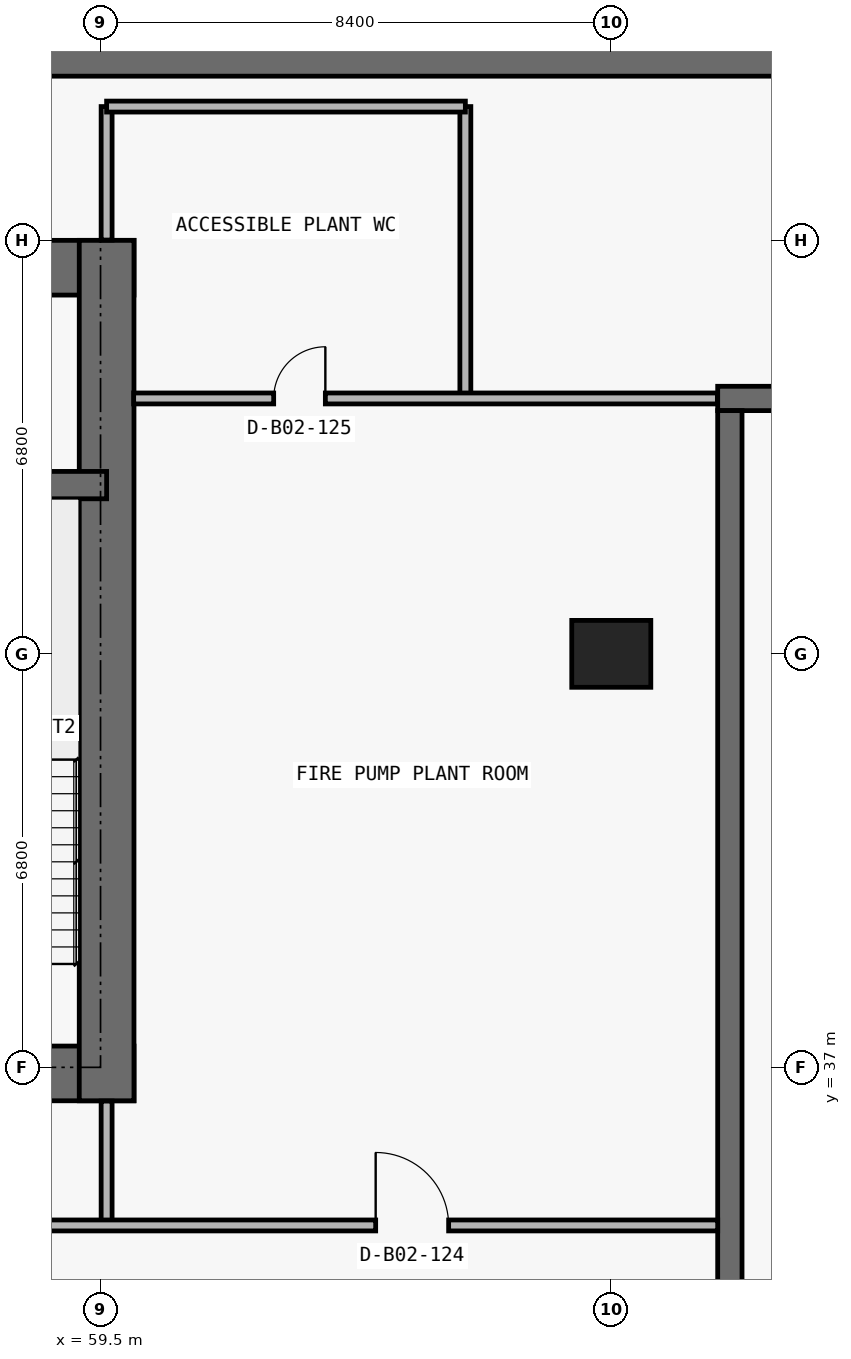
"""IFC4 building model, lengths in metres.
Left out: names, types, materials, properties, quantities, classifications, styles, units other than length and angle.
Written with IfcOpenShell. Run it as: python <this file> out.ifc"""

import sys

from ifc_helpers import new_model, si_unit, direction, frame, frame_2d, origin, origin_2d, place, context, subcontext, project, spatial, rectangle, extrude, element, fill, save


model = new_model("IFC4")
c1 = context("Model", 3, precision=1e-05, world=origin(), true_north=direction((0.0, 1.0)))
c2 = subcontext(c1, "Body", "Model", "MODEL_VIEW")
j1 = project(units=[si_unit("LENGTHUNIT", "METRE"), si_unit("PLANEANGLEUNIT", "RADIAN")], contexts=[c1])
p1 = place(None, origin())
s1 = spatial("IfcSite", under=j1, at=p1, CompositionType="ELEMENT")
p2 = place(p1, origin())
s2 = spatial("IfcBuilding", under=s1, at=p2, CompositionType="ELEMENT")
p3 = place(p2, frame((0.0, 0.0, -9.0)))
s3 = spatial("IfcBuildingStorey", under=s2, at=p3, CompositionType="ELEMENT", Elevation=-9.0)
p4 = place(p3, frame((0.0, 53.55, 0.0), z_axis=(0.0, 0.0, 1.0), x_axis=(1.0, 0.0, 0.0)))
e1 = element("IfcWall", 1, at=p4, inside=s3, PredefinedType="SOLIDWALL", context=c2, shape_type="SweptSolid", body=[
    extrude(rectangle(XDim=77.8, YDim=0.5, at=frame_2d((38.9, 0.0))), origin(), (0.0, 0.0, 1.0), 4.2),
])
p5 = place(p3, frame((69.65, 48.0, 0.0), z_axis=(0.0, 0.0, 1.0), x_axis=(1.0, 0.0, 0.0)))
e2 = element("IfcWall", 2, at=p5, inside=s3, PredefinedType="SHEAR", context=c2, shape_type="SweptSolid", body=[
    extrude(rectangle(XDim=6.4, YDim=0.4, at=frame_2d((3.2, 0.0))), origin(), (0.0, 0.0, 1.0), 4.2),
])
p6 = place(p3, frame((69.85, 24.0, 0.0), z_axis=(0.0, 0.0, 1.0), x_axis=(0.0, 1.0, 0.0)))
e3 = element("IfcWall", 3, at=p6, inside=s3, PredefinedType="SHEAR", context=c2, shape_type="SweptSolid", body=[
    extrude(rectangle(XDim=23.8, YDim=0.4, at=frame_2d((11.9, 0.0))), origin(), (0.0, 0.0, 1.0), 4.2),
])
p7 = place(p3, frame((67.9, 43.8, 0.0), z_axis=(0.0, 0.0, 1.0), x_axis=(1.0, 0.0, 0.0)))
e4 = element("IfcColumn", 4, at=p7, inside=s3, PredefinedType="COLUMN", context=c2, shape_type="SweptSolid", body=[
    extrude(rectangle(XDim=1.3, YDim=1.1, at=origin_2d()), origin(), (0.0, 0.0, 1.0), 4.2),
])
p8 = place(p3, frame((17.75, 36.9, 0.0), z_axis=(0.0, 0.0, 1.0), x_axis=(1.0, 0.0, 0.0)))
e5 = element("IfcWall", 5, at=p8, inside=s3, PredefinedType="SHEAR", context=c2, shape_type="SweptSolid", body=[
    extrude(rectangle(XDim=42.3, YDim=0.9, at=frame_2d((21.15, 0.0))), origin(), (0.0, 0.0, 1.0), 4.2),
])
p9 = place(p8, frame((14.55, 0.0, 0.0)))
e6 = element("IfcOpeningElement", 6, at=p9, cuts=e5, PredefinedType="OPENING", context=c2, shape_type="SweptSolid", body=[
    extrude(rectangle(XDim=1.1, YDim=2.15, at=frame_2d((0.55, 1.075))), frame((0.0, 0.46, 0.0), z_axis=(0.0, -1.0, 0.0), x_axis=(1.0, 0.0, 0.0)), (0.0, 0.0, 1.0), 0.92),
])
p10 = place(p8, frame((6.4, 0.0, 0.0)))
e7 = element("IfcOpeningElement", 7, at=p10, cuts=e5, PredefinedType="OPENING", context=c2, shape_type="SweptSolid", body=[
    extrude(rectangle(XDim=1.05, YDim=2.15, at=frame_2d((0.525, 1.075))), frame((0.0, 0.46, 0.0), z_axis=(0.0, -1.0, 0.0), x_axis=(1.0, 0.0, 0.0)), (0.0, 0.0, 1.0), 0.92),
])
p11 = place(p8, frame((34.9, 0.0, 0.0)))
e8 = element("IfcOpeningElement", 8, at=p11, cuts=e5, PredefinedType="OPENING", context=c2, shape_type="SweptSolid", body=[
    extrude(rectangle(XDim=1.05, YDim=2.15, at=frame_2d((0.525, 1.075))), frame((0.0, 0.46, 0.0), z_axis=(0.0, -1.0, 0.0), x_axis=(1.0, 0.0, 0.0)), (0.0, 0.0, 1.0), 0.92),
])
p12 = place(p8, frame((11.012, 0.0, 0.0)))
e9 = element("IfcOpeningElement", 9, at=p12, cuts=e5, PredefinedType="OPENING", context=c2, shape_type="SweptSolid", body=[
    extrude(rectangle(XDim=1.05, YDim=2.15, at=frame_2d((0.525, 1.075))), frame((0.0, 0.46, 0.0), z_axis=(0.0, -1.0, 0.0), x_axis=(1.0, 0.0, 0.0)), (0.0, 0.0, 1.0), 0.92),
])
p13 = place(p8, frame((24.25, 0.0, 0.0)))
e10 = element("IfcOpeningElement", 10, at=p13, cuts=e5, PredefinedType="OPENING", context=c2, shape_type="SweptSolid", body=[
    extrude(rectangle(XDim=1.05, YDim=2.15, at=frame_2d((0.525, 1.075))), frame((0.0, 0.46, 0.0), z_axis=(0.0, -1.0, 0.0), x_axis=(1.0, 0.0, 0.0)), (0.0, 0.0, 1.0), 0.92),
])
p14 = place(p3, frame((17.75, 50.15, 0.0), z_axis=(0.0, 0.0, 1.0), x_axis=(1.0, 0.0, 0.0)))
e11 = element("IfcWall", 11, at=p14, inside=s3, PredefinedType="SHEAR", context=c2, shape_type="SweptSolid", body=[
    extrude(rectangle(XDim=42.3, YDim=0.9, at=frame_2d((21.15, 0.0))), origin(), (0.0, 0.0, 1.0), 4.2),
])
p15 = place(p3, frame((59.6, 36.45, 0.0), z_axis=(0.0, 0.0, 1.0), x_axis=(0.0, 1.0, 0.0)))
e12 = element("IfcWall", 12, at=p15, inside=s3, PredefinedType="SHEAR", context=c2, shape_type="SweptSolid", body=[
    extrude(rectangle(XDim=14.15, YDim=0.9, at=frame_2d((7.075, 0.0))), origin(), (0.0, 0.0, 1.0), 4.2),
])
p16 = place(p3, frame((18.2, 46.575, 0.0), z_axis=(0.0, 0.0, 1.0), x_axis=(1.0, 0.0, 0.0)))
e13 = element("IfcWall", 13, at=p16, inside=s3, PredefinedType="SHEAR", context=c2, shape_type="SweptSolid", body=[
    extrude(rectangle(XDim=41.4, YDim=0.45, at=frame_2d((20.7, 0.0))), origin(), (0.0, 0.0, 1.0), 4.2),
])
p17 = place(p16, frame((7.675, 0.0, 0.0)))
e14 = element("IfcOpeningElement", 14, at=p17, cuts=e13, PredefinedType="OPENING", context=c2, shape_type="SweptSolid", body=[
    extrude(rectangle(XDim=1.05, YDim=2.15, at=frame_2d((0.525, 1.075))), frame((0.0, 0.235, 0.0), z_axis=(0.0, -1.0, 0.0), x_axis=(1.0, 0.0, 0.0)), (0.0, 0.0, 1.0), 0.47),
])
p18 = place(p16, frame((32.725, 0.0, 0.0)))
e15 = element("IfcOpeningElement", 15, at=p18, cuts=e13, PredefinedType="OPENING", context=c2, shape_type="SweptSolid", body=[
    extrude(rectangle(XDim=1.05, YDim=2.15, at=frame_2d((0.525, 1.075))), frame((0.0, 0.235, 0.0), z_axis=(0.0, -1.0, 0.0), x_axis=(1.0, 0.0, 0.0)), (0.0, 0.0, 1.0), 0.47),
])
p19 = place(p3, frame((59.6, 34.4, 0.0), z_axis=(0.0, 0.0, 1.0), x_axis=(0.0, 1.0, 0.0)))
e16 = element("IfcWall", 16, at=p19, inside=s3, PredefinedType="PARTITIONING", context=c2, shape_type="SweptSolid", body=[
    extrude(rectangle(XDim=2.045, YDim=0.18, at=frame_2d((1.022, 0.0))), origin(), (0.0, 0.0, 1.0), 3.085),
])
p20 = place(p3, frame((59.6, 50.605, 0.0), z_axis=(0.0, 0.0, 1.0), x_axis=(0.0, 1.0, 0.0)))
e17 = element("IfcWall", 17, at=p20, inside=s3, PredefinedType="PARTITIONING", context=c2, shape_type="SweptSolid", body=[
    extrude(rectangle(XDim=2.195, YDim=0.18, at=frame_2d((1.098, 0.0))), origin(), (0.0, 0.0, 1.0), 4.2),
])
p21 = place(p3, frame((65.5, 48.0, 0.0), z_axis=(0.0, 0.0, 1.0), x_axis=(0.0, 1.0, 0.0)))
e18 = element("IfcWall", 18, at=p21, inside=s3, PredefinedType="PARTITIONING", context=c2, shape_type="SweptSolid", body=[
    extrude(rectangle(XDim=4.8, YDim=0.18, at=frame_2d((2.4, 0.0))), origin(), (0.0, 0.0, 1.0), 4.2),
])
p22 = place(p3, frame((8.15, 34.4, 0.0), z_axis=(0.0, 0.0, 1.0), x_axis=(1.0, 0.0, 0.0)))
e19 = element("IfcWall", 19, at=p22, inside=s3, PredefinedType="PARTITIONING", context=c2, shape_type="SweptSolid", body=[
    extrude(rectangle(XDim=61.5, YDim=0.18, at=frame_2d((30.75, 0.0))), origin(), (0.0, 0.0, 1.0), 4.2),
])
p23 = place(p22, frame((30.15, 0.0, 0.0)))
e20 = element("IfcOpeningElement", 20, at=p23, cuts=e19, PredefinedType="OPENING", context=c2, shape_type="SweptSolid", body=[
    extrude(rectangle(XDim=1.2, YDim=2.2, at=frame_2d((0.6, 1.1))), frame((0.0, 0.1, 0.0), z_axis=(0.0, -1.0, 0.0), x_axis=(1.0, 0.0, 0.0)), (0.0, 0.0, 1.0), 0.2),
])
p24 = place(p22, frame((4.425, 0.0, 0.0)))
e21 = element("IfcOpeningElement", 21, at=p24, cuts=e19, PredefinedType="OPENING", context=c2, shape_type="SweptSolid", body=[
    extrude(rectangle(XDim=1.2, YDim=2.2, at=frame_2d((0.6, 1.1))), frame((0.0, 0.1, 0.0), z_axis=(0.0, -1.0, 0.0), x_axis=(1.0, 0.0, 0.0)), (0.0, 0.0, 1.0), 0.2),
])
p25 = place(p22, frame((55.875, 0.0, 0.0)))
e22 = element("IfcOpeningElement", 22, at=p25, cuts=e19, PredefinedType="OPENING", context=c2, shape_type="SweptSolid", body=[
    extrude(rectangle(XDim=1.2, YDim=2.2, at=frame_2d((0.6, 1.1))), frame((0.0, 0.1, 0.0), z_axis=(0.0, -1.0, 0.0), x_axis=(1.0, 0.0, 0.0)), (0.0, 0.0, 1.0), 0.2),
])
p26 = place(p3, frame((60.045, 48.0, 0.0), z_axis=(0.0, 0.0, 1.0), x_axis=(1.0, 0.0, 0.0)))
e23 = element("IfcWall", 23, at=p26, inside=s3, PredefinedType="PARTITIONING", context=c2, shape_type="SweptSolid", body=[
    extrude(rectangle(XDim=9.6, YDim=0.18, at=frame_2d((4.8, 0.0))), origin(), (0.0, 0.0, 1.0), 4.2),
])
p27 = place(p26, frame((2.302, 0.0, 0.0)))
e24 = element("IfcOpeningElement", 24, at=p27, cuts=e23, PredefinedType="OPENING", context=c2, shape_type="SweptSolid", body=[
    extrude(rectangle(XDim=0.85, YDim=2.1, at=frame_2d((0.425, 1.05))), frame((0.0, 0.1, 0.0), z_axis=(0.0, -1.0, 0.0), x_axis=(1.0, 0.0, 0.0)), (0.0, 0.0, 1.0), 0.2),
])
p28 = place(p3, frame((59.6, 52.8, 0.0), z_axis=(0.0, 0.0, 1.0), x_axis=(1.0, 0.0, 0.0)))
e25 = element("IfcWall", 25, at=p28, inside=s3, PredefinedType="PARTITIONING", context=c2, shape_type="SweptSolid", body=[
    extrude(rectangle(XDim=5.9, YDim=0.18, at=frame_2d((2.95, 0.0))), origin(), (0.0, 0.0, 1.0), 4.2),
])
p29 = place(p25, origin())
e26 = element("IfcDoor", 26, at=p29, inside=s3, OperationType="SINGLE_SWING_LEFT", PredefinedType="DOOR", context=c2, shape_type="SweptSolid", body=[
    extrude(rectangle(XDim=1.2, YDim=2.2, at=frame_2d((0.6, 1.1))), frame((0.0, 0.025, 0.0), z_axis=(0.0, -1.0, 0.0), x_axis=(1.0, 0.0, 0.0)), (0.0, 0.0, 1.0), 0.05),
])
fill(e22, e26)
p30 = place(p27, origin())
e27 = element("IfcDoor", 27, at=p30, inside=s3, OperationType="SINGLE_SWING_RIGHT", PredefinedType="DOOR", context=c2, shape_type="SweptSolid", body=[
    extrude(rectangle(XDim=0.85, YDim=2.1, at=frame_2d((0.425, 1.05))), frame((0.0, 0.025, 0.0), z_axis=(0.0, -1.0, 0.0), x_axis=(1.0, 0.0, 0.0)), (0.0, 0.0, 1.0), 0.05),
])
fill(e24, e27)
save(model, sys.argv[1])
